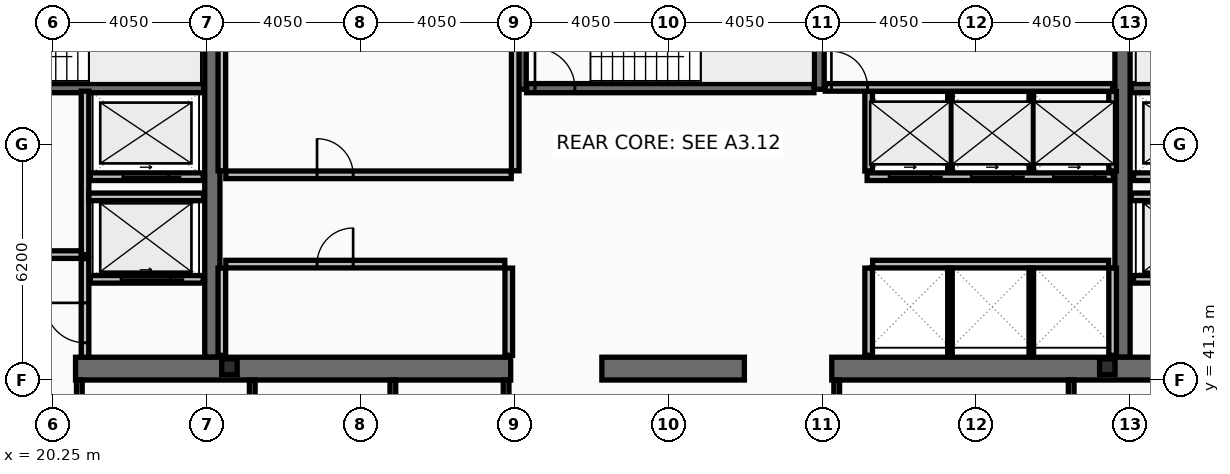
"""IFC4 building model, lengths in metres.
Left out: names, types, materials, properties, quantities, classifications, styles, units other than length and angle.
Written with IfcOpenShell. Run it as: python <this file> out.ifc"""

import sys

from ifc_helpers import new_model, si_unit, direction, frame, frame_2d, origin, origin_2d, place, context, subcontext, project, spatial, rectangle, i_section, extrude, element, fill, save


model = new_model("IFC4")
c1 = context("Model", 3, precision=1e-05, world=origin(), true_north=direction((0.0, 1.0)))
c2 = subcontext(c1, "Body", "Model", "MODEL_VIEW")
j1 = project(units=[si_unit("LENGTHUNIT", "METRE"), si_unit("PLANEANGLEUNIT", "RADIAN")], contexts=[c1])
p1 = place(None, origin())
s1 = spatial("IfcSite", under=j1, at=p1, CompositionType="ELEMENT")
p2 = place(p1, origin())
s2 = spatial("IfcBuilding", under=s1, at=p2, CompositionType="ELEMENT")
p3 = place(p2, frame((0.0, 0.0, 213.8)))
s3 = spatial("IfcBuildingStorey", under=s2, at=p3, CompositionType="ELEMENT", Elevation=213.8)
for number, where, z_axis, x_axis in (
    (1, (24.45, 41.9, 0.0), (0.0, 0.0, 1.0), (0.0, 1.0, 0.0)),
    (2, (48.4, 41.9, 0.0), (0.0, 0.0, 1.0), (0.0, 1.0, 0.0)),
):
    element("IfcWall", number, at=place(p3, frame(where, z_axis=z_axis, x_axis=x_axis)), inside=s3, PredefinedType="SHEAR", context=c2, shape_type="SweptSolid", body=[
        extrude(rectangle(XDim=11.2, YDim=0.4, at=frame_2d((5.6, 0.0))), origin(), (0.0, 0.0, 1.0), 3.44),
    ])
p4 = place(p3, frame((32.3, 41.6, 0.0), z_axis=(0.0, 0.0, 1.0), x_axis=(-1.0, 0.0, 0.0)))
e3 = element("IfcWall", 3, at=p4, inside=s3, PredefinedType="SHEAR", context=c2, shape_type="SweptSolid", body=[
    extrude(rectangle(XDim=11.45, YDim=0.6, at=frame_2d((5.725, 0.0))), origin(), (0.0, 0.0, 1.0), 3.44),
])
p5 = place(p3, frame((38.45, 41.6, 0.0), z_axis=(0.0, 0.0, 1.0), x_axis=(-1.0, 0.0, 0.0)))
e4 = element("IfcWall", 4, at=p5, inside=s3, PredefinedType="SHEAR", context=c2, shape_type="SweptSolid", body=[
    extrude(rectangle(XDim=3.75, YDim=0.6, at=frame_2d((1.875, 0.0))), origin(), (0.0, 0.0, 1.0), 3.44),
])
p6 = place(p3, frame((52.05, 41.6, 0.0), z_axis=(0.0, 0.0, 1.0), x_axis=(-1.0, 0.0, 0.0)))
e5 = element("IfcWall", 5, at=p6, inside=s3, PredefinedType="SHEAR", context=c2, shape_type="SweptSolid", body=[
    extrude(rectangle(XDim=11.3, YDim=0.6, at=frame_2d((5.65, 0.0))), origin(), (0.0, 0.0, 1.0), 3.44),
])
for number, where, z_axis, x_axis in (
    (6, (32.58, 48.95, 0.0), (0.0, 0.0, 1.0), (0.0, 1.0, 0.0)),
    (7, (40.42, 48.95, 0.0), (0.0, 0.0, 1.0), (0.0, 1.0, 0.0)),
):
    element("IfcWall", number, at=place(p3, frame(where, z_axis=z_axis, x_axis=x_axis)), inside=s3, PredefinedType="SHEAR", context=c2, shape_type="SweptSolid", body=[
        extrude(rectangle(XDim=4.15, YDim=0.26, at=frame_2d((2.075, 0.0))), origin(), (0.0, 0.0, 1.0), 3.44),
    ])
p7 = place(p3, frame((16.8, 48.98, 0.0), z_axis=(0.0, 0.0, 1.0), x_axis=(1.0, 0.0, 0.0)))
e8 = element("IfcWall", 8, at=p7, inside=s3, PredefinedType="SHEAR", context=c2, shape_type="SweptSolid", body=[
    extrude(rectangle(XDim=7.42, YDim=0.24, at=frame_2d((3.71, 0.0))), origin(), (0.0, 0.0, 1.0), 3.44),
])
p8 = place(p7, frame((0.22, 0.0, 0.0)))
e9 = element("IfcOpeningElement", 9, at=p8, cuts=e8, PredefinedType="OPENING", context=c2, shape_type="SweptSolid", body=[
    extrude(rectangle(XDim=1.05, YDim=2.15, at=frame_2d((0.525, 1.075))), frame((0.0, 0.13, 0.0), z_axis=(0.0, -1.0, 0.0), x_axis=(1.0, 0.0, 0.0)), (0.0, 0.0, 1.0), 0.26),
])
p9 = place(p3, frame((48.63, 48.98, 0.0), z_axis=(0.0, 0.0, 1.0), x_axis=(1.0, 0.0, 0.0)))
e10 = element("IfcWall", 10, at=p9, inside=s3, PredefinedType="SHEAR", context=c2, shape_type="SweptSolid", body=[
    extrude(rectangle(XDim=7.47, YDim=0.24, at=frame_2d((3.735, 0.0))), origin(), (0.0, 0.0, 1.0), 3.44),
])
p10 = place(p9, frame((6.2, 0.0, 0.0)))
e11 = element("IfcOpeningElement", 11, at=p10, cuts=e10, PredefinedType="OPENING", context=c2, shape_type="SweptSolid", body=[
    extrude(rectangle(XDim=1.05, YDim=2.15, at=frame_2d((0.525, 1.075))), frame((0.0, 0.13, 0.0), z_axis=(0.0, -1.0, 0.0), x_axis=(1.0, 0.0, 0.0)), (0.0, 0.0, 1.0), 0.26),
])
p11 = place(p3, frame((32.72, 48.98, 0.0), z_axis=(0.0, 0.0, 1.0), x_axis=(1.0, 0.0, 0.0)))
e12 = element("IfcWall", 12, at=p11, inside=s3, PredefinedType="SHEAR", context=c2, shape_type="SweptSolid", body=[
    extrude(rectangle(XDim=7.56, YDim=0.24, at=frame_2d((3.78, 0.0))), origin(), (0.0, 0.0, 1.0), 3.44),
])
p12 = place(p11, frame((0.22, 0.0, 0.0)))
e13 = element("IfcOpeningElement", 13, at=p12, cuts=e12, PredefinedType="OPENING", context=c2, shape_type="SweptSolid", body=[
    extrude(rectangle(XDim=1.05, YDim=2.15, at=frame_2d((0.525, 1.075))), frame((0.0, 0.13, 0.0), z_axis=(0.0, -1.0, 0.0), x_axis=(1.0, 0.0, 0.0)), (0.0, 0.0, 1.0), 0.26),
])
for number, where, z_axis, x_axis in (
    (14, (24.9, 41.65, 0.0), (0.0, 0.0, 1.0), (1.0, 0.0, 0.0)),
    (15, (48.0, 41.65, 0.0), (0.0, 0.0, 1.0), (1.0, 0.0, 0.0)),
):
    element("IfcColumn", number, at=place(p3, frame(where, z_axis=z_axis, x_axis=x_axis)), inside=s3, PredefinedType="COLUMN", context=c2, shape_type="SweptSolid", body=[
        extrude(i_section(OverallWidth=0.406, OverallDepth=0.416, WebThickness=0.03, FlangeThickness=0.048, at=origin_2d()), origin(), (0.0, 0.0, 1.0), 3.6),
    ])
p13 = place(p3, frame((51.61, 43.95, 0.0), z_axis=(0.0, 0.0, 1.0), x_axis=(-1.0, 0.0, 0.0)))
e16 = element("IfcWall", 16, at=p13, inside=s3, PredefinedType="PARTITIONING", context=c2, shape_type="SweptSolid", body=[
    extrude(rectangle(XDim=2.92, YDim=0.2, at=frame_2d((1.46, 0.0))), origin(), (0.0, 0.0, 1.0), 3.44),
])
p14 = place(p13, frame((0.81, 0.0, 0.0)))
e17 = element("IfcOpeningElement", 17, at=p14, cuts=e16, PredefinedType="OPENING", context=c2, shape_type="SweptSolid", body=[
    extrude(rectangle(XDim=1.3, YDim=2.18, at=frame_2d((0.65, 1.09))), frame((0.0, 0.11, 0.0), z_axis=(0.0, -1.0, 0.0), x_axis=(1.0, 0.0, 0.0)), (0.0, 0.0, 1.0), 0.22),
])
p15 = place(p3, frame((24.21, 43.95, 0.0), z_axis=(0.0, 0.0, 1.0), x_axis=(-1.0, 0.0, 0.0)))
e18 = element("IfcWall", 18, at=p15, inside=s3, PredefinedType="PARTITIONING", context=c2, shape_type="SweptSolid", body=[
    extrude(rectangle(XDim=2.97, YDim=0.2, at=frame_2d((1.485, 0.0))), origin(), (0.0, 0.0, 1.0), 3.44),
])
p16 = place(p15, frame((0.86, 0.0, 0.0)))
e19 = element("IfcOpeningElement", 19, at=p16, cuts=e18, PredefinedType="OPENING", context=c2, shape_type="SweptSolid", body=[
    extrude(rectangle(XDim=1.3, YDim=2.18, at=frame_2d((0.65, 1.09))), frame((0.0, 0.11, 0.0), z_axis=(0.0, -1.0, 0.0), x_axis=(1.0, 0.0, 0.0)), (0.0, 0.0, 1.0), 0.22),
])
p17 = place(p3, frame((51.61, 46.65, 0.0), z_axis=(0.0, 0.0, 1.0), x_axis=(-1.0, 0.0, 0.0)))
e20 = element("IfcWall", 20, at=p17, inside=s3, PredefinedType="PARTITIONING", context=c2, shape_type="SweptSolid", body=[
    extrude(rectangle(XDim=2.92, YDim=0.2, at=frame_2d((1.46, 0.0))), origin(), (0.0, 0.0, 1.0), 3.44),
])
p18 = place(p17, frame((0.86, 0.0, 0.0)))
e21 = element("IfcOpeningElement", 21, at=p18, cuts=e20, PredefinedType="OPENING", context=c2, shape_type="SweptSolid", body=[
    extrude(rectangle(XDim=1.2, YDim=2.18, at=frame_2d((0.6, 1.09))), frame((0.0, 0.11, 0.0), z_axis=(0.0, -1.0, 0.0), x_axis=(1.0, 0.0, 0.0)), (0.0, 0.0, 1.0), 0.22),
])
p19 = place(p3, frame((24.21, 46.65, 0.0), z_axis=(0.0, 0.0, 1.0), x_axis=(-1.0, 0.0, 0.0)))
e22 = element("IfcWall", 22, at=p19, inside=s3, PredefinedType="PARTITIONING", context=c2, shape_type="SweptSolid", body=[
    extrude(rectangle(XDim=2.97, YDim=0.2, at=frame_2d((1.485, 0.0))), origin(), (0.0, 0.0, 1.0), 3.44),
])
p20 = place(p19, frame((0.91, 0.0, 0.0)))
e23 = element("IfcOpeningElement", 23, at=p20, cuts=e22, PredefinedType="OPENING", context=c2, shape_type="SweptSolid", body=[
    extrude(rectangle(XDim=1.2, YDim=2.18, at=frame_2d((0.6, 1.09))), frame((0.0, 0.11, 0.0), z_axis=(0.0, -1.0, 0.0), x_axis=(1.0, 0.0, 0.0)), (0.0, 0.0, 1.0), 0.22),
])
p21 = place(p3, frame((48.16, 46.65, 0.0), z_axis=(0.0, 0.0, 1.0), x_axis=(-1.0, 0.0, 0.0)))
e24 = element("IfcWall", 24, at=p21, inside=s3, PredefinedType="PARTITIONING", context=c2, shape_type="SweptSolid", body=[
    extrude(rectangle(XDim=6.48, YDim=0.2, at=frame_2d((3.24, 0.0))), origin(), (0.0, 0.0, 1.0), 3.44),
])
p22 = place(p21, frame((4.8, 0.0, 0.0)))
e25 = element("IfcOpeningElement", 25, at=p22, cuts=e24, PredefinedType="OPENING", context=c2, shape_type="SweptSolid", body=[
    extrude(rectangle(XDim=1.1, YDim=2.18, at=frame_2d((0.55, 1.09))), frame((0.0, 0.11, 0.0), z_axis=(0.0, -1.0, 0.0), x_axis=(1.0, 0.0, 0.0)), (0.0, 0.0, 1.0), 0.22),
])
p23 = place(p21, frame((2.64, 0.0, 0.0)))
e26 = element("IfcOpeningElement", 26, at=p23, cuts=e24, PredefinedType="OPENING", context=c2, shape_type="SweptSolid", body=[
    extrude(rectangle(XDim=1.1, YDim=2.18, at=frame_2d((0.55, 1.09))), frame((0.0, 0.11, 0.0), z_axis=(0.0, -1.0, 0.0), x_axis=(1.0, 0.0, 0.0)), (0.0, 0.0, 1.0), 0.22),
])
p24 = place(p21, frame((0.48, 0.0, 0.0)))
e27 = element("IfcOpeningElement", 27, at=p24, cuts=e24, PredefinedType="OPENING", context=c2, shape_type="SweptSolid", body=[
    extrude(rectangle(XDim=1.1, YDim=2.18, at=frame_2d((0.55, 1.09))), frame((0.0, 0.11, 0.0), z_axis=(0.0, -1.0, 0.0), x_axis=(1.0, 0.0, 0.0)), (0.0, 0.0, 1.0), 0.22),
])
p25 = place(p3, frame((21.1, 44.6, 0.0), z_axis=(0.0, 0.0, 1.0), x_axis=(0.0, 1.0, 0.0)))
e28 = element("IfcWall", 28, at=p25, inside=s3, PredefinedType="PARTITIONING", context=c2, shape_type="SweptSolid", body=[
    extrude(rectangle(XDim=4.3, YDim=0.2, at=frame_2d((2.15, 0.0))), origin(), (0.0, 0.0, 1.0), 3.44),
])
p26 = place(p3, frame((16.8, 44.6, 0.0), z_axis=(0.0, 0.0, 1.0), x_axis=(1.0, 0.0, 0.0)))
e29 = element("IfcWall", 29, at=p26, inside=s3, PredefinedType="PARTITIONING", context=c2, shape_type="SweptSolid", body=[
    extrude(rectangle(XDim=4.2, YDim=0.2, at=frame_2d((2.1, 0.0))), origin(), (0.0, 0.0, 1.0), 3.44),
])
p27 = place(p26, frame((1.25, 0.0, 0.0)))
e30 = element("IfcOpeningElement", 30, at=p27, cuts=e29, PredefinedType="OPENING", context=c2, shape_type="SweptSolid", body=[
    extrude(rectangle(XDim=1.05, YDim=2.15, at=frame_2d((0.525, 1.075))), frame((0.0, 0.11, 0.0), z_axis=(0.0, -1.0, 0.0), x_axis=(1.0, 0.0, 0.0)), (0.0, 0.0, 1.0), 0.22),
])
p28 = place(p3, frame((21.2, 46.12, 0.0), z_axis=(0.0, 0.0, 1.0), x_axis=(1.0, 0.0, 0.0)))
e31 = element("IfcWall", 31, at=p28, inside=s3, PredefinedType="PARTITIONING", context=c2, shape_type="SweptSolid", body=[
    extrude(rectangle(XDim=3.02, YDim=0.2, at=frame_2d((1.51, 0.0))), origin(), (0.0, 0.0, 1.0), 3.44),
])
p29 = place(p3, frame((21.1, 41.9, 0.0), z_axis=(0.0, 0.0, 1.0), x_axis=(0.0, 1.0, 0.0)))
e32 = element("IfcWall", 32, at=p29, inside=s3, PredefinedType="PARTITIONING", context=c2, shape_type="SweptSolid", body=[
    extrude(rectangle(XDim=2.595, YDim=0.2, at=frame_2d((1.298, 0.0))), origin(), (0.0, 0.0, 1.0), 3.44),
])
p30 = place(p29, frame((0.38, 0.0, 0.0)))
e33 = element("IfcOpeningElement", 33, at=p30, cuts=e32, PredefinedType="OPENING", context=c2, shape_type="SweptSolid", body=[
    extrude(rectangle(XDim=1.05, YDim=2.15, at=frame_2d((0.525, 1.075))), frame((0.0, 0.11, 0.0), z_axis=(0.0, -1.0, 0.0), x_axis=(1.0, 0.0, 0.0)), (0.0, 0.0, 1.0), 0.22),
])
p31 = place(p3, frame((48.63, 46.12, 0.0), z_axis=(0.0, 0.0, 1.0), x_axis=(1.0, 0.0, 0.0)))
e34 = element("IfcWall", 34, at=p31, inside=s3, PredefinedType="PARTITIONING", context=c2, shape_type="SweptSolid", body=[
    extrude(rectangle(XDim=3.07, YDim=0.2, at=frame_2d((1.535, 0.0))), origin(), (0.0, 0.0, 1.0), 3.44),
])
for number, where, z_axis, x_axis in (
    (35, (24.7, 46.805, 0.0), (0.0, 0.0, 1.0), (0.0, 1.0, 0.0)),
    (36, (32.42, 46.805, 0.0), (0.0, 0.0, 1.0), (0.0, 1.0, 0.0)),
):
    element("IfcWall", number, at=place(p3, frame(where, z_axis=z_axis, x_axis=x_axis)), inside=s3, PredefinedType="PARTITIONING", context=c2, shape_type="SweptSolid", body=[
        extrude(rectangle(XDim=5.99, YDim=0.2, at=frame_2d((2.995, 0.0))), origin(), (0.0, 0.0, 1.0), 3.44),
    ])
p32 = place(p3, frame((24.805, 46.7, 0.0), z_axis=(0.0, 0.0, 1.0), x_axis=(1.0, 0.0, 0.0)))
e37 = element("IfcWall", 37, at=p32, inside=s3, PredefinedType="PARTITIONING", context=c2, shape_type="SweptSolid", body=[
    extrude(rectangle(XDim=7.51, YDim=0.2, at=frame_2d((3.755, 0.0))), origin(), (0.0, 0.0, 1.0), 3.44),
])
p33 = place(p32, frame((2.4, 0.0, 0.0)))
e38 = element("IfcOpeningElement", 38, at=p33, cuts=e37, PredefinedType="OPENING", context=c2, shape_type="SweptSolid", body=[
    extrude(rectangle(XDim=0.95, YDim=2.1, at=frame_2d((0.475, 1.05))), frame((0.0, 0.11, 0.0), z_axis=(0.0, -1.0, 0.0), x_axis=(1.0, 0.0, 0.0)), (0.0, 0.0, 1.0), 0.22),
])
for number, where, z_axis, x_axis in (
    (39, (24.7, 41.95, 0.0), (0.0, 0.0, 1.0), (0.0, 1.0, 0.0)),
    (40, (32.25, 41.95, 0.0), (0.0, 0.0, 1.0), (0.0, 1.0, 0.0)),
):
    element("IfcWall", number, at=place(p3, frame(where, z_axis=z_axis, x_axis=x_axis)), inside=s3, PredefinedType="PARTITIONING", context=c2, shape_type="SweptSolid", body=[
        extrude(rectangle(XDim=2.295, YDim=0.2, at=frame_2d((1.147, 0.0))), origin(), (0.0, 0.0, 1.0), 3.44),
    ])
p34 = place(p3, frame((24.805, 44.35, 0.0), z_axis=(0.0, 0.0, 1.0), x_axis=(1.0, 0.0, 0.0)))
e41 = element("IfcWall", 41, at=p34, inside=s3, PredefinedType="PARTITIONING", context=c2, shape_type="SweptSolid", body=[
    extrude(rectangle(XDim=7.34, YDim=0.2, at=frame_2d((3.67, 0.0))), origin(), (0.0, 0.0, 1.0), 3.44),
])
p35 = place(p34, frame((2.4, 0.0, 0.0)))
e42 = element("IfcOpeningElement", 42, at=p35, cuts=e41, PredefinedType="OPENING", context=c2, shape_type="SweptSolid", body=[
    extrude(rectangle(XDim=0.95, YDim=2.1, at=frame_2d((0.475, 1.05))), frame((0.0, 0.11, 0.0), z_axis=(0.0, -1.0, 0.0), x_axis=(1.0, 0.0, 0.0)), (0.0, 0.0, 1.0), 0.22),
])
for number, where, z_axis, x_axis in (
    (43, (41.72, 46.8, 0.0), (0.0, 0.0, 1.0), (0.0, 1.0, 0.0)),
    (44, (48.14, 46.8, 0.0), (0.0, 0.0, 1.0), (0.0, 1.0, 0.0)),
):
    element("IfcWall", number, at=place(p3, frame(where, z_axis=z_axis, x_axis=x_axis)), inside=s3, PredefinedType="PARTITIONING", context=c2, shape_type="SweptSolid", body=[
        extrude(rectangle(XDim=2.095, YDim=0.2, at=frame_2d((1.047, 0.0))), origin(), (0.0, 0.0, 1.0), 3.44),
    ])
for number, where, z_axis, x_axis in (
    (45, (43.86, 46.8, 0.0), (0.0, 0.0, 1.0), (0.0, 1.0, 0.0)),
    (46, (46.0, 46.8, 0.0), (0.0, 0.0, 1.0), (0.0, 1.0, 0.0)),
):
    element("IfcWall", number, at=place(p3, frame(where, z_axis=z_axis, x_axis=x_axis)), inside=s3, PredefinedType="PARTITIONING", context=c2, shape_type="SweptSolid", body=[
        extrude(rectangle(XDim=2.095, YDim=0.12, at=frame_2d((1.047, 0.0))), origin(), (0.0, 0.0, 1.0), 3.44),
    ])
p36 = place(p3, frame((41.825, 44.35, 0.0), z_axis=(0.0, 0.0, 1.0), x_axis=(1.0, 0.0, 0.0)))
e47 = element("IfcWall", 47, at=p36, inside=s3, PredefinedType="PARTITIONING", context=c2, shape_type="SweptSolid", body=[
    extrude(rectangle(XDim=6.21, YDim=0.2, at=frame_2d((3.105, 0.0))), origin(), (0.0, 0.0, 1.0), 3.44),
])
for number, where, z_axis, x_axis in (
    (48, (41.72, 41.95, 0.0), (0.0, 0.0, 1.0), (0.0, 1.0, 0.0)),
    (49, (48.14, 41.95, 0.0), (0.0, 0.0, 1.0), (0.0, 1.0, 0.0)),
):
    element("IfcWall", number, at=place(p3, frame(where, z_axis=z_axis, x_axis=x_axis)), inside=s3, PredefinedType="PARTITIONING", context=c2, shape_type="SweptSolid", body=[
        extrude(rectangle(XDim=2.295, YDim=0.2, at=frame_2d((1.147, 0.0))), origin(), (0.0, 0.0, 1.0), 3.44),
    ])
for number, where, z_axis, x_axis in (
    (50, (43.86, 41.95, 0.0), (0.0, 0.0, 1.0), (0.0, 1.0, 0.0)),
    (51, (46.0, 41.95, 0.0), (0.0, 0.0, 1.0), (0.0, 1.0, 0.0)),
):
    element("IfcWall", number, at=place(p3, frame(where, z_axis=z_axis, x_axis=x_axis)), inside=s3, PredefinedType="PARTITIONING", context=c2, shape_type="SweptSolid", body=[
        extrude(rectangle(XDim=2.295, YDim=0.12, at=frame_2d((1.147, 0.0))), origin(), (0.0, 0.0, 1.0), 3.44),
    ])
p37 = place(p3, frame((40.58, 49.0, 0.0), z_axis=(0.0, 0.0, 1.0), x_axis=(1.0, 0.0, 0.0)))
e52 = element("IfcWall", 52, at=p37, inside=s3, PredefinedType="PARTITIONING", context=c2, shape_type="SweptSolid", body=[
    extrude(rectangle(XDim=7.56, YDim=0.2, at=frame_2d((3.78, 0.0))), origin(), (0.0, 0.0, 1.0), 3.44),
])
p38 = place(p37, frame((0.16, 0.0, 0.0)))
e53 = element("IfcOpeningElement", 53, at=p38, cuts=e52, PredefinedType="OPENING", context=c2, shape_type="SweptSolid", body=[
    extrude(rectangle(XDim=0.95, YDim=2.1, at=frame_2d((0.475, 1.05))), frame((0.0, 0.11, 0.0), z_axis=(0.0, -1.0, 0.0), x_axis=(1.0, 0.0, 0.0)), (0.0, 0.0, 1.0), 0.22),
])
for number, where, z_axis, x_axis in (
    (54, (20.95, 38.28, 0.0), (0.0, 0.0, 1.0), (0.0, 1.0, 0.0)),
    (55, (25.5, 38.28, 0.0), (0.0, 0.0, 1.0), (0.0, 1.0, 0.0)),
    (56, (29.2, 38.28, 0.0), (0.0, 0.0, 1.0), (0.0, 1.0, 0.0)),
    (57, (32.18, 38.28, 0.0), (0.0, 0.0, 1.0), (0.0, 1.0, 0.0)),
    (58, (40.88, 38.28, 0.0), (0.0, 0.0, 1.0), (0.0, 1.0, 0.0)),
    (59, (47.05, 38.28, 0.0), (0.0, 0.0, 1.0), (0.0, 1.0, 0.0)),
):
    element("IfcWall", number, at=place(p3, frame(where, z_axis=z_axis, x_axis=x_axis)), inside=s3, PredefinedType="PARTITIONING", context=c2, shape_type="SweptSolid", body=[
        extrude(rectangle(XDim=3.02, YDim=0.15, at=frame_2d((1.51, 0.0))), origin(), (0.0, 0.0, 1.0), 3.44),
    ])
p39 = place(p12, origin())
e60 = element("IfcDoor", 60, at=p39, inside=s3, OperationType="SINGLE_SWING_LEFT", PredefinedType="DOOR", context=c2, shape_type="SweptSolid", body=[
    extrude(rectangle(XDim=1.05, YDim=2.15, at=frame_2d((0.525, 1.075))), frame((0.0, 0.025, 0.0), z_axis=(0.0, -1.0, 0.0), x_axis=(1.0, 0.0, 0.0)), (0.0, 0.0, 1.0), 0.05),
])
fill(e13, e60)
p40 = place(p16, origin())
e61 = element("IfcDoor", 61, at=p40, inside=s3, OperationType="SLIDING_TO_LEFT", PredefinedType="DOOR", context=c2, shape_type="SweptSolid", body=[
    extrude(rectangle(XDim=1.3, YDim=2.18, at=frame_2d((0.65, 1.09))), frame((0.0, 0.025, 0.0), z_axis=(0.0, -1.0, 0.0), x_axis=(1.0, 0.0, 0.0)), (0.0, 0.0, 1.0), 0.05),
])
fill(e19, e61)
p41 = place(p20, origin())
e62 = element("IfcDoor", 62, at=p41, inside=s3, OperationType="SLIDING_TO_LEFT", PredefinedType="DOOR", context=c2, shape_type="SweptSolid", body=[
    extrude(rectangle(XDim=1.2, YDim=2.18, at=frame_2d((0.6, 1.09))), frame((0.0, 0.025, 0.0), z_axis=(0.0, -1.0, 0.0), x_axis=(1.0, 0.0, 0.0)), (0.0, 0.0, 1.0), 0.05),
])
fill(e23, e62)
p42 = place(p22, origin())
e63 = element("IfcDoor", 63, at=p42, inside=s3, OperationType="SLIDING_TO_LEFT", PredefinedType="DOOR", context=c2, shape_type="SweptSolid", body=[
    extrude(rectangle(XDim=1.1, YDim=2.18, at=frame_2d((0.55, 1.09))), frame((0.0, 0.025, 0.0), z_axis=(0.0, -1.0, 0.0), x_axis=(1.0, 0.0, 0.0)), (0.0, 0.0, 1.0), 0.05),
])
fill(e25, e63)
p43 = place(p23, origin())
e64 = element("IfcDoor", 64, at=p43, inside=s3, OperationType="SLIDING_TO_LEFT", PredefinedType="DOOR", context=c2, shape_type="SweptSolid", body=[
    extrude(rectangle(XDim=1.1, YDim=2.18, at=frame_2d((0.55, 1.09))), frame((0.0, 0.025, 0.0), z_axis=(0.0, -1.0, 0.0), x_axis=(1.0, 0.0, 0.0)), (0.0, 0.0, 1.0), 0.05),
])
fill(e26, e64)
p44 = place(p24, origin())
e65 = element("IfcDoor", 65, at=p44, inside=s3, OperationType="SLIDING_TO_LEFT", PredefinedType="DOOR", context=c2, shape_type="SweptSolid", body=[
    extrude(rectangle(XDim=1.1, YDim=2.18, at=frame_2d((0.55, 1.09))), frame((0.0, 0.025, 0.0), z_axis=(0.0, -1.0, 0.0), x_axis=(1.0, 0.0, 0.0)), (0.0, 0.0, 1.0), 0.05),
])
fill(e27, e65)
p45 = place(p30, origin())
e66 = element("IfcDoor", 66, at=p45, inside=s3, OperationType="SINGLE_SWING_RIGHT", PredefinedType="DOOR", context=c2, shape_type="SweptSolid", body=[
    extrude(rectangle(XDim=1.05, YDim=2.15, at=frame_2d((0.525, 1.075))), frame((0.0, 0.025, 0.0), z_axis=(0.0, -1.0, 0.0), x_axis=(1.0, 0.0, 0.0)), (0.0, 0.0, 1.0), 0.05),
])
fill(e33, e66)
p46 = place(p33, origin())
e67 = element("IfcDoor", 67, at=p46, inside=s3, OperationType="SINGLE_SWING_LEFT", PredefinedType="DOOR", context=c2, shape_type="SweptSolid", body=[
    extrude(rectangle(XDim=0.95, YDim=2.1, at=frame_2d((0.475, 1.05))), frame((0.0, 0.025, 0.0), z_axis=(0.0, -1.0, 0.0), x_axis=(1.0, 0.0, 0.0)), (0.0, 0.0, 1.0), 0.05),
])
fill(e38, e67)
p47 = place(p35, origin())
e68 = element("IfcDoor", 68, at=p47, inside=s3, OperationType="SINGLE_SWING_RIGHT", PredefinedType="DOOR", context=c2, shape_type="SweptSolid", body=[
    extrude(rectangle(XDim=0.95, YDim=2.1, at=frame_2d((0.475, 1.05))), frame((0.0, 0.025, 0.0), z_axis=(0.0, -1.0, 0.0), x_axis=(1.0, 0.0, 0.0)), (0.0, 0.0, 1.0), 0.05),
])
fill(e42, e68)
p48 = place(p38, origin())
e69 = element("IfcDoor", 69, at=p48, inside=s3, OperationType="SINGLE_SWING_LEFT", PredefinedType="DOOR", context=c2, shape_type="SweptSolid", body=[
    extrude(rectangle(XDim=0.95, YDim=2.1, at=frame_2d((0.475, 1.05))), frame((0.0, 0.025, 0.0), z_axis=(0.0, -1.0, 0.0), x_axis=(1.0, 0.0, 0.0)), (0.0, 0.0, 1.0), 0.05),
])
fill(e53, e69)
save(model, sys.argv[1])
